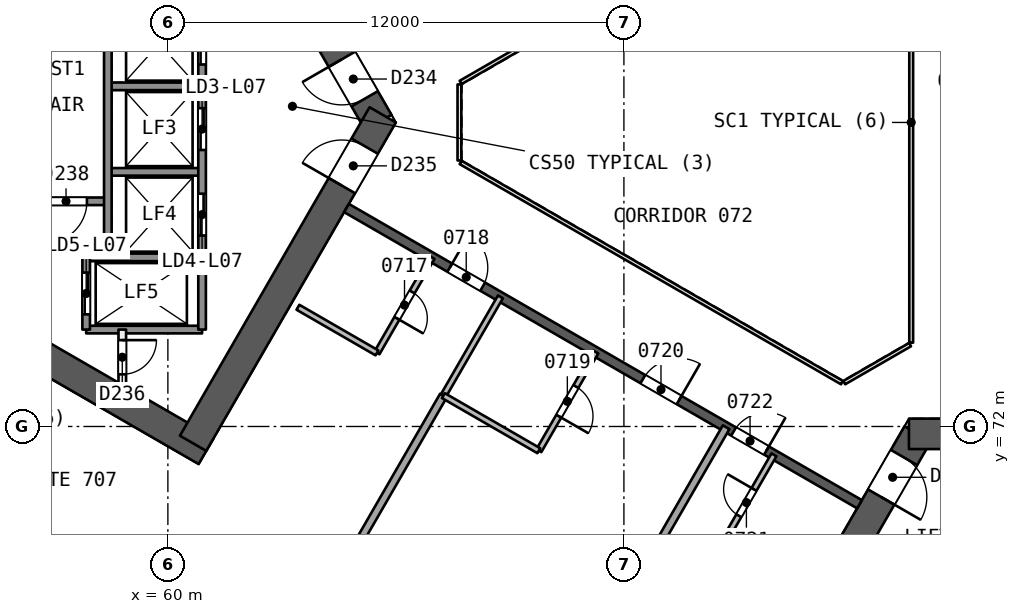
"""IFC4 building model, lengths in metres.
Left out: names, types, materials, properties, quantities, classifications, styles, units other than length and angle.
Written with IfcOpenShell. Run it as: python <this file> out.ifc"""

import sys

from ifc_helpers import new_model, si_unit, direction, frame, frame_2d, origin, place, context, subcontext, project, spatial, rectangle, extrude, element, fill, save


model = new_model("IFC4")
c1 = context("Model", 3, precision=1e-05, world=origin(), true_north=direction((0.0, 1.0)))
c2 = subcontext(c1, "Body", "Model", "MODEL_VIEW")
j1 = project(units=[si_unit("LENGTHUNIT", "METRE"), si_unit("PLANEANGLEUNIT", "RADIAN")], contexts=[c1])
p1 = place(None, origin())
s1 = spatial("IfcSite", under=j1, at=p1, CompositionType="ELEMENT")
p2 = place(p1, origin())
s2 = spatial("IfcBuilding", under=s1, at=p2, CompositionType="ELEMENT")
p3 = place(p2, frame((0.0, 0.0, 37.4)))
s3 = spatial("IfcBuildingStorey", under=s2, at=p3, CompositionType="ELEMENT", Elevation=37.4)
p4 = place(p3, frame((65.538, 80.0, 0.0), z_axis=(0.0, 0.0, 1.0), x_axis=(-0.49999662545, 0.866027352073, 0.0)))
e1 = element("IfcWall", 1, at=p4, inside=s3, PredefinedType="SHEAR", context=c2, shape_type="SweptSolid", body=[
    extrude(rectangle(XDim=10.149, YDim=0.8, at=frame_2d((5.074, 0.0))), origin(), (0.0, 0.0, 1.0), 3.7),
])
p5 = place(p4, frame((0.719, 0.0, 0.0)))
e2 = element("IfcOpeningElement", 2, at=p5, cuts=e1, PredefinedType="OPENING", context=c2, shape_type="SweptSolid", body=[
    extrude(rectangle(XDim=1.2, YDim=2.1, at=frame_2d((0.6, 1.05))), frame((0.0, 0.411, 0.0), z_axis=(0.0, -1.0, 0.0), x_axis=(1.0, 0.0, 0.0)), (0.0, 0.0, 1.0), 0.821),
])
p6 = place(p3, frame((60.664, 88.443, 0.0), z_axis=(0.0, 0.0, 1.0), x_axis=(-0.866029478545, -0.499992942241, 0.0)))
e3 = element("IfcWall", 3, at=p6, inside=s3, PredefinedType="SHEAR", context=c2, shape_type="SweptSolid", body=[
    extrude(rectangle(XDim=13.933, YDim=0.8, at=frame_2d((6.967, 0.0))), origin(), (0.0, 0.0, 1.0), 3.7),
])
p7 = place(p3, frame((48.797, 78.408, 0.0), z_axis=(0.0, 0.0, 1.0), x_axis=(0.866032504327, -0.499987701298, 0.0)))
e4 = element("IfcWall", 4, at=p7, inside=s3, PredefinedType="SHEAR", context=c2, shape_type="SweptSolid", body=[
    extrude(rectangle(XDim=14.102, YDim=0.8, at=frame_2d((7.051, 0.0))), origin(), (0.0, 0.0, 1.0), 3.7),
])
p8 = place(p3, frame((60.664, 71.557, 0.0), z_axis=(0.0, 0.0, 1.0), x_axis=(0.50000409368, 0.866023040284, 0.0)))
e5 = element("IfcWall", 5, at=p8, inside=s3, PredefinedType="SHEAR", context=c2, shape_type="SweptSolid", body=[
    extrude(rectangle(XDim=9.98, YDim=0.8, at=frame_2d((4.99, 0.0))), origin(), (0.0, 0.0, 1.0), 3.7),
])
p9 = place(p8, frame((7.83, 0.0, 0.0)))
e6 = element("IfcOpeningElement", 6, at=p9, cuts=e5, PredefinedType="OPENING", context=c2, shape_type="SweptSolid", body=[
    extrude(rectangle(XDim=1.2, YDim=2.1, at=frame_2d((0.6, 1.05))), frame((0.0, 0.411, 0.0), z_axis=(0.0, -1.0, 0.0), x_axis=(1.0, 0.0, 0.0)), (0.0, 0.0, 1.0), 0.821),
])
p10 = place(p3, frame((79.731, 71.806, 0.0), z_axis=(0.0, 0.0, 1.0), x_axis=(-0.49999662545, -0.866027352073, 0.0)))
e7 = element("IfcWall", 7, at=p10, inside=s3, PredefinedType="SHEAR", context=c2, shape_type="SweptSolid", body=[
    extrude(rectangle(XDim=10.149, YDim=0.8, at=frame_2d((5.074, 0.0))), origin(), (0.0, 0.0, 1.0), 3.7),
])
p11 = place(p10, frame((0.719, 0.0, 0.0)))
e8 = element("IfcOpeningElement", 8, at=p11, cuts=e7, PredefinedType="OPENING", context=c2, shape_type="SweptSolid", body=[
    extrude(rectangle(XDim=1.2, YDim=2.1, at=frame_2d((0.6, 1.05))), frame((0.0, 0.411, 0.0), z_axis=(0.0, -1.0, 0.0), x_axis=(1.0, 0.0, 0.0)), (0.0, 0.0, 1.0), 0.821),
])
p12 = place(p3, frame((89.48, 71.806, 0.0), z_axis=(0.0, 0.0, 1.0), x_axis=(-1.0, 0.0, 0.0)))
e9 = element("IfcWall", 9, at=p12, inside=s3, PredefinedType="SHEAR", context=c2, shape_type="SweptSolid", body=[
    extrude(rectangle(XDim=9.98, YDim=0.8, at=frame_2d((4.99, 0.0))), origin(), (0.0, 0.0, 1.0), 3.7),
])
p13 = place(p12, frame((7.83, 0.0, 0.0)))
e10 = element("IfcOpeningElement", 10, at=p13, cuts=e9, PredefinedType="OPENING", context=c2, shape_type="SweptSolid", body=[
    extrude(rectangle(XDim=1.2, YDim=2.1, at=frame_2d((0.6, 1.05))), frame((0.0, 0.411, 0.0), z_axis=(0.0, -1.0, 0.0), x_axis=(1.0, 0.0, 0.0)), (0.0, 0.0, 1.0), 0.821),
])
p14 = place(p3, frame((64.7, 77.748, 0.0), z_axis=(0.0, 0.0, 1.0), x_axis=(0.866026492143, -0.499998114903, 0.0)))
e11 = element("IfcWall", 11, at=p14, inside=s3, PredefinedType="SHEAR", context=c2, shape_type="SweptSolid", body=[
    extrude(rectangle(XDim=15.588, YDim=0.25, at=frame_2d((7.794, 0.0))), origin(), (0.0, 0.0, 1.0), 3.2),
])
p15 = place(p14, frame((3.138, 0.0, 0.0)))
e12 = element("IfcOpeningElement", 12, at=p15, cuts=e11, PredefinedType="OPENING", context=c2, shape_type="SweptSolid", body=[
    extrude(rectangle(XDim=1.0, YDim=2.1, at=frame_2d((0.5, 1.05))), frame((0.0, 0.135, 0.0), z_axis=(0.0, -1.0, 0.0), x_axis=(1.0, 0.0, 0.0)), (0.0, 0.0, 1.0), 0.271),
])
p16 = place(p14, frame((9.006, 0.0, 0.0)))
e13 = element("IfcOpeningElement", 13, at=p16, cuts=e11, PredefinedType="OPENING", context=c2, shape_type="SweptSolid", body=[
    extrude(rectangle(XDim=1.1, YDim=2.1, at=frame_2d((0.55, 1.05))), frame((0.0, 0.135, 0.0), z_axis=(0.0, -1.0, 0.0), x_axis=(1.0, 0.0, 0.0)), (0.0, 0.0, 1.0), 0.271),
])
p17 = place(p14, frame((11.762, 0.0, 0.0)))
e14 = element("IfcOpeningElement", 14, at=p17, cuts=e11, PredefinedType="OPENING", context=c2, shape_type="SweptSolid", body=[
    extrude(rectangle(XDim=1.0, YDim=2.1, at=frame_2d((0.5, 1.05))), frame((0.0, 0.135, 0.0), z_axis=(0.0, -1.0, 0.0), x_axis=(1.0, 0.0, 0.0)), (0.0, 0.0, 1.0), 0.271),
])
p18 = place(p3, frame((66.952, 76.448, 0.0), z_axis=(0.0, 0.0, 1.0), x_axis=(-0.499987231761, -0.866032775405, 0.0)))
e15 = element("IfcWall", 15, at=p18, inside=s3, PredefinedType="PARTITIONING", context=c2, shape_type="SweptSolid", body=[
    extrude(rectangle(XDim=2.9, YDim=0.15, at=frame_2d((1.45, 0.0))), origin(), (0.0, 0.0, 1.0), 3.2),
])
p19 = place(p18, frame((1.05, 0.0, 0.0)))
e16 = element("IfcOpeningElement", 16, at=p19, cuts=e15, PredefinedType="OPENING", context=c2, shape_type="SweptSolid", body=[
    extrude(rectangle(XDim=0.8, YDim=2.1, at=frame_2d((0.4, 1.05))), frame((0.0, 0.085, 0.0), z_axis=(0.0, -1.0, 0.0), x_axis=(1.0, 0.0, 0.0)), (0.0, 0.0, 1.0), 0.171),
])
p20 = place(p3, frame((65.502, 73.937, 0.0), z_axis=(0.0, 0.0, 1.0), x_axis=(-0.865994240961, 0.500053971709, 0.0)))
e17 = element("IfcWall", 17, at=p20, inside=s3, PredefinedType="PARTITIONING", context=c2, shape_type="SweptSolid", body=[
    extrude(rectangle(XDim=2.401, YDim=0.15, at=frame_2d((1.201, 0.0))), origin(), (0.0, 0.0, 1.0), 3.2),
])
p21 = place(p3, frame((61.699, 63.198, 0.0), z_axis=(0.0, 0.0, 1.0), x_axis=(0.499999115929, 0.866025914202, 0.0)))
e18 = element("IfcWall", 18, at=p21, inside=s3, PredefinedType="PARTITIONING", context=c2, shape_type="SweptSolid", body=[
    extrude(rectangle(XDim=11.102, YDim=0.2, at=frame_2d((5.551, 0.0))), origin(), (0.0, 0.0, 1.0), 3.2),
])
p22 = place(p3, frame((67.25, 72.812, 0.0), z_axis=(0.0, 0.0, 1.0), x_axis=(0.499990139034, 0.866031096941, 0.0)))
e19 = element("IfcWall", 19, at=p22, inside=s3, PredefinedType="PARTITIONING", context=c2, shape_type="SweptSolid", body=[
    extrude(rectangle(XDim=3.0, YDim=0.15, at=frame_2d((1.5, 0.0))), origin(), (0.0, 0.0, 1.0), 3.2),
])
p23 = place(p3, frame((71.261, 73.96, 0.0), z_axis=(0.0, 0.0, 1.0), x_axis=(-0.50002537861, -0.866010750942, 0.0)))
e20 = element("IfcWall", 20, at=p23, inside=s3, PredefinedType="PARTITIONING", context=c2, shape_type="SweptSolid", body=[
    extrude(rectangle(XDim=3.0, YDim=0.15, at=frame_2d((1.5, 0.0))), origin(), (0.0, 0.0, 1.0), 3.2),
])
p24 = place(p23, frame((1.05, 0.0, 0.0)))
e21 = element("IfcOpeningElement", 21, at=p24, cuts=e20, PredefinedType="OPENING", context=c2, shape_type="SweptSolid", body=[
    extrude(rectangle(XDim=0.9, YDim=2.1, at=frame_2d((0.45, 1.05))), frame((0.0, 0.085, 0.0), z_axis=(0.0, -1.0, 0.0), x_axis=(1.0, 0.0, 0.0)), (0.0, 0.0, 1.0), 0.171),
])
p25 = place(p3, frame((69.761, 71.362, 0.0), z_axis=(0.0, 0.0, 1.0), x_axis=(-0.866032775405, 0.499987231761, 0.0)))
e22 = element("IfcWall", 22, at=p25, inside=s3, PredefinedType="PARTITIONING", context=c2, shape_type="SweptSolid", body=[
    extrude(rectangle(XDim=2.9, YDim=0.15, at=frame_2d((1.45, 0.0))), origin(), (0.0, 0.0, 1.0), 3.2),
])
p26 = place(p3, frame((67.639, 59.768, 0.0), z_axis=(0.0, 0.0, 1.0), x_axis=(0.499997206141, 0.866027016814, 0.0)))
e23 = element("IfcWall", 23, at=p26, inside=s3, PredefinedType="PARTITIONING", context=c2, shape_type="SweptSolid", body=[
    extrude(rectangle(XDim=14.102, YDim=0.2, at=frame_2d((7.051, 0.0))), origin(), (0.0, 0.0, 1.0), 3.2),
])
p27 = place(p3, frame((74.498, 68.743, 0.0), z_axis=(0.0, 0.0, 1.0), x_axis=(0.499987231761, 0.866032775405, 0.0)))
e24 = element("IfcWall", 24, at=p27, inside=s3, PredefinedType="PARTITIONING", context=c2, shape_type="SweptSolid", body=[
    extrude(rectangle(XDim=2.9, YDim=0.15, at=frame_2d((1.45, 0.0))), origin(), (0.0, 0.0, 1.0), 3.2),
])
p28 = place(p27, frame((1.05, 0.0, 0.0)))
e25 = element("IfcOpeningElement", 25, at=p28, cuts=e24, PredefinedType="OPENING", context=c2, shape_type="SweptSolid", body=[
    extrude(rectangle(XDim=0.8, YDim=2.1, at=frame_2d((0.4, 1.05))), frame((0.0, 0.085, 0.0), z_axis=(0.0, -1.0, 0.0), x_axis=(1.0, 0.0, 0.0)), (0.0, 0.0, 1.0), 0.171),
])
p29 = place(p3, frame((90.91, 46.161, 0.0), z_axis=(0.0, 0.0, 1.0), x_axis=(-0.866026524777, 0.499998058379, 0.0)))
e26 = element("IfcWall", 26, at=p29, inside=s3, PredefinedType="SOLIDWALL", context=c2, shape_type="SweptSolid", body=[
    extrude(rectangle(XDim=61.395, YDim=0.3, at=frame_2d((30.698, 0.0))), origin(), (0.0, 0.0, 1.0), 3.2),
])
p30 = place(p29, frame((29.186, 0.0, 0.0)))
e27 = element("IfcOpeningElement", 27, at=p30, cuts=e26, PredefinedType="OPENING", context=c2, shape_type="SweptSolid", body=[
    extrude(rectangle(XDim=2.4, YDim=2.4, at=frame_2d((1.2, 1.2))), frame((0.0, 0.161, 0.0), z_axis=(0.0, -1.0, 0.0), x_axis=(1.0, 0.0, 0.0)), (0.0, 0.0, 1.0), 0.321),
])
p31 = place(p29, frame((46.448, 0.0, 0.0)))
e28 = element("IfcOpeningElement", 28, at=p31, cuts=e26, PredefinedType="OPENING", context=c2, shape_type="SweptSolid", body=[
    extrude(rectangle(XDim=2.4, YDim=2.4, at=frame_2d((1.2, 1.2))), frame((0.0, 0.161, 0.0), z_axis=(0.0, -1.0, 0.0), x_axis=(1.0, 0.0, 0.0)), (0.0, 0.0, 1.0), 0.321),
])
p32 = place(p29, frame((12.235, 0.0, 0.0)))
e29 = element("IfcOpeningElement", 29, at=p32, cuts=e26, PredefinedType="OPENING", context=c2, shape_type="SweptSolid", body=[
    extrude(rectangle(XDim=2.4, YDim=2.4, at=frame_2d((1.2, 1.2))), frame((0.0, 0.161, 0.0), z_axis=(0.0, -1.0, 0.0), x_axis=(1.0, 0.0, 0.0)), (0.0, 0.0, 1.0), 0.321),
])
for number, where, z_axis, x_axis in (
    (30, (60.9, 80.95, 0.0), (0.0, 0.0, 1.0), (-1.0, 0.0, 0.0)),
    (31, (60.9, 78.7, 0.0), (0.0, 0.0, 1.0), (-1.0, 0.0, 0.0)),
):
    element("IfcWall", number, at=place(p3, frame(where, z_axis=z_axis, x_axis=x_axis)), inside=s3, PredefinedType="SOLIDWALL", context=c2, shape_type="SweptSolid", body=[
        extrude(rectangle(XDim=2.48, YDim=0.2, at=frame_2d((1.24, 0.0))), origin(), (0.0, 0.0, 1.0), 3.2),
    ])
p33 = place(p3, frame((58.42, 77.925, 0.0), z_axis=(0.0, 0.0, 1.0), x_axis=(-1.0, 0.0, 0.0)))
e32 = element("IfcWall", 32, at=p33, inside=s3, PredefinedType="SOLIDWALL", context=c2, shape_type="SweptSolid", body=[
    extrude(rectangle(XDim=7.7, YDim=0.2, at=frame_2d((3.85, 0.0))), origin(), (0.0, 0.0, 1.0), 3.2),
])
p34 = place(p33, frame((0.55, 0.0, 0.0)))
e33 = element("IfcOpeningElement", 33, at=p34, cuts=e32, PredefinedType="OPENING", context=c2, shape_type="SweptSolid", body=[
    extrude(rectangle(XDim=1.1, YDim=2.1, at=frame_2d((0.55, 1.05))), frame((0.0, 0.11, 0.0), z_axis=(0.0, -1.0, 0.0), x_axis=(1.0, 0.0, 0.0)), (0.0, 0.0, 1.0), 0.221),
])
for number, where, z_axis, x_axis in (
    (34, (60.9, 76.45, 0.0), (0.0, 0.0, 1.0), (-1.0, 0.0, 0.0)),
    (35, (60.9, 74.55, 0.0), (0.0, 0.0, 1.0), (-1.0, 0.0, 0.0)),
):
    element("IfcWall", number, at=place(p3, frame(where, z_axis=z_axis, x_axis=x_axis)), inside=s3, PredefinedType="SOLIDWALL", context=c2, shape_type="SweptSolid", body=[
        extrude(rectangle(XDim=3.05, YDim=0.2, at=frame_2d((1.525, 0.0))), origin(), (0.0, 0.0, 1.0), 3.2),
    ])
p35 = place(p3, frame((60.9, 85.45, 0.0), z_axis=(0.0, 0.0, 1.0), x_axis=(0.0, -1.0, 0.0)))
e36 = element("IfcWall", 36, at=p35, inside=s3, PredefinedType="SOLIDWALL", context=c2, shape_type="SweptSolid", body=[
    extrude(rectangle(XDim=10.9, YDim=0.2, at=frame_2d((5.45, 0.0))), origin(), (0.0, 0.0, 1.0), 3.2),
])
p36 = place(p35, frame((0.575, 0.0, 0.0)))
e37 = element("IfcOpeningElement", 37, at=p36, cuts=e36, PredefinedType="OPENING", context=c2, shape_type="SweptSolid", body=[
    extrude(rectangle(XDim=1.1, YDim=2.1, at=frame_2d((0.55, 1.05))), frame((0.0, 0.11, 0.0), z_axis=(0.0, -1.0, 0.0), x_axis=(1.0, 0.0, 0.0)), (0.0, 0.0, 1.0), 0.221),
])
p37 = place(p35, frame((2.825, 0.0, 0.0)))
e38 = element("IfcOpeningElement", 38, at=p37, cuts=e36, PredefinedType="OPENING", context=c2, shape_type="SweptSolid", body=[
    extrude(rectangle(XDim=1.1, YDim=2.1, at=frame_2d((0.55, 1.05))), frame((0.0, 0.11, 0.0), z_axis=(0.0, -1.0, 0.0), x_axis=(1.0, 0.0, 0.0)), (0.0, 0.0, 1.0), 0.221),
])
p38 = place(p35, frame((5.075, 0.0, 0.0)))
e39 = element("IfcOpeningElement", 39, at=p38, cuts=e36, PredefinedType="OPENING", context=c2, shape_type="SweptSolid", body=[
    extrude(rectangle(XDim=1.1, YDim=2.1, at=frame_2d((0.55, 1.05))), frame((0.0, 0.11, 0.0), z_axis=(0.0, -1.0, 0.0), x_axis=(1.0, 0.0, 0.0)), (0.0, 0.0, 1.0), 0.221),
])
p39 = place(p35, frame((7.325, 0.0, 0.0)))
e40 = element("IfcOpeningElement", 40, at=p39, cuts=e36, PredefinedType="OPENING", context=c2, shape_type="SweptSolid", body=[
    extrude(rectangle(XDim=1.1, YDim=2.1, at=frame_2d((0.55, 1.05))), frame((0.0, 0.11, 0.0), z_axis=(0.0, -1.0, 0.0), x_axis=(1.0, 0.0, 0.0)), (0.0, 0.0, 1.0), 0.221),
])
p40 = place(p3, frame((58.8, 74.55, 0.0), z_axis=(0.0, 0.0, 1.0), x_axis=(0.0, -1.0, 0.0)))
e41 = element("IfcWall", 41, at=p40, inside=s3, PredefinedType="PARTITIONING", context=c2, shape_type="SweptSolid", body=[
    extrude(rectangle(XDim=1.455, YDim=0.2, at=frame_2d((0.728, 0.0))), origin(), (0.0, 0.0, 1.0), 3.2),
])
p41 = place(p40, frame((0.278, 0.0, 0.0)))
e42 = element("IfcOpeningElement", 42, at=p41, cuts=e41, PredefinedType="OPENING", context=c2, shape_type="SweptSolid", body=[
    extrude(rectangle(XDim=0.9, YDim=2.1, at=frame_2d((0.45, 1.05))), frame((0.0, 0.11, 0.0), z_axis=(0.0, -1.0, 0.0), x_axis=(1.0, 0.0, 0.0)), (0.0, 0.0, 1.0), 0.221),
])
p42 = place(p3, frame((58.42, 85.45, 0.0), z_axis=(0.0, 0.0, 1.0), x_axis=(0.0, -1.0, 0.0)))
e43 = element("IfcWall", 43, at=p42, inside=s3, PredefinedType="SOLIDWALL", context=c2, shape_type="SweptSolid", body=[
    extrude(rectangle(XDim=9.0, YDim=0.2, at=frame_2d((4.5, 0.0))), origin(), (0.0, 0.0, 1.0), 3.2),
])
p43 = place(p3, frame((57.85, 76.45, 0.0), z_axis=(0.0, 0.0, 1.0), x_axis=(0.0, -1.0, 0.0)))
e44 = element("IfcWall", 44, at=p43, inside=s3, PredefinedType="SOLIDWALL", context=c2, shape_type="SweptSolid", body=[
    extrude(rectangle(XDim=1.9, YDim=0.2, at=frame_2d((0.95, 0.0))), origin(), (0.0, 0.0, 1.0), 3.2),
])
p44 = place(p43, frame((0.4, 0.0, 0.0)))
e45 = element("IfcOpeningElement", 45, at=p44, cuts=e44, PredefinedType="OPENING", context=c2, shape_type="SweptSolid", body=[
    extrude(rectangle(XDim=1.1, YDim=2.1, at=frame_2d((0.55, 1.05))), frame((0.0, 0.11, 0.0), z_axis=(0.0, -1.0, 0.0), x_axis=(1.0, 0.0, 0.0)), (0.0, 0.0, 1.0), 0.221),
])
p45 = place(p3, frame((77.135, 64.952, 0.0), z_axis=(0.0, 0.0, 1.0), x_axis=(0.866031916153, 0.499988720078, 0.0)))
e46 = element("IfcWall", 46, at=p45, inside=s3, PredefinedType="SOLIDWALL", context=c2, shape_type="SweptSolid", body=[
    extrude(rectangle(XDim=11.35, YDim=0.2, at=frame_2d((5.675, 0.0))), origin(), (0.0, 0.0, 1.0), 3.2),
])
for number, where, z_axis, x_axis in (
    (47, (79.56, 74.206, 0.0), (0.0, 0.0, 1.0), (0.0, 1.0, 0.0)),
    (48, (77.738, 86.846, 0.0), (0.0, 0.0, 1.0), (-0.866, -0.5, 0.0)),
):
    element("IfcWall", number, at=place(p3, frame(where, z_axis=z_axis, x_axis=x_axis)), inside=s3, PredefinedType="PARTITIONING", context=c2, shape_type="SweptSolid", body=[
        extrude(rectangle(XDim=11.588, YDim=0.1, at=frame_2d((5.794, 0.0))), origin(), (0.0, 0.0, 1.0), 3.2),
    ])
p46 = place(p3, frame((67.672, 81.0, 0.0), z_axis=(0.0, 0.0, 1.0), x_axis=(0.0, -1.0, 0.0)))
e49 = element("IfcWall", 49, at=p46, inside=s3, PredefinedType="PARTITIONING", context=c2, shape_type="SweptSolid", body=[
    extrude(rectangle(XDim=2.0, YDim=0.1, at=frame_2d((1.0, 0.0))), origin(), (0.0, 0.0, 1.0), 3.2),
])
p47 = place(p3, frame((67.702, 78.948, 0.0), z_axis=(0.0, 0.0, 1.0), x_axis=(0.866026658274, -0.499997827154, 0.0)))
e50 = element("IfcWall", 50, at=p47, inside=s3, PredefinedType="PARTITIONING", context=c2, shape_type="SweptSolid", body=[
    extrude(rectangle(XDim=11.588, YDim=0.1, at=frame_2d((5.794, 0.0))), origin(), (0.0, 0.0, 1.0), 3.2),
])
p48 = place(p3, frame((77.798, 73.154, 0.0), z_axis=(0.0, 0.0, 1.0), x_axis=(0.866041268327, 0.499972520799, 0.0)))
e51 = element("IfcWall", 51, at=p48, inside=s3, PredefinedType="PARTITIONING", context=c2, shape_type="SweptSolid", body=[
    extrude(rectangle(XDim=2.0, YDim=0.1, at=frame_2d((1.0, 0.0))), origin(), (0.0, 0.0, 1.0), 3.2),
])
p49 = place(p19, origin())
e52 = element("IfcDoor", 52, at=p49, inside=s3, OperationType="SINGLE_SWING_RIGHT", PredefinedType="NOTDEFINED", context=c2, shape_type="SweptSolid", body=[
    extrude(rectangle(XDim=0.8, YDim=2.1, at=frame_2d((0.4, 1.05))), frame((0.0, 0.025, 0.0), z_axis=(0.0, -1.0, 0.0), x_axis=(1.0, 0.0, 0.0)), (0.0, 0.0, 1.0), 0.05),
])
fill(e16, e52)
p50 = place(p15, origin())
e53 = element("IfcDoor", 53, at=p50, inside=s3, OperationType="SINGLE_SWING_LEFT", PredefinedType="NOTDEFINED", context=c2, shape_type="SweptSolid", body=[
    extrude(rectangle(XDim=1.0, YDim=2.1, at=frame_2d((0.5, 1.05))), frame((0.0, 0.025, 0.0), z_axis=(0.0, -1.0, 0.0), x_axis=(1.0, 0.0, 0.0)), (0.0, 0.0, 1.0), 0.05),
])
fill(e12, e53)
p51 = place(p24, origin())
e54 = element("IfcDoor", 54, at=p51, inside=s3, OperationType="SINGLE_SWING_RIGHT", PredefinedType="NOTDEFINED", context=c2, shape_type="SweptSolid", body=[
    extrude(rectangle(XDim=0.9, YDim=2.1, at=frame_2d((0.45, 1.05))), frame((0.0, 0.025, 0.0), z_axis=(0.0, -1.0, 0.0), x_axis=(1.0, 0.0, 0.0)), (0.0, 0.0, 1.0), 0.05),
])
fill(e21, e54)
p52 = place(p16, origin())
e55 = element("IfcDoor", 55, at=p52, inside=s3, OperationType="SINGLE_SWING_RIGHT", PredefinedType="NOTDEFINED", context=c2, shape_type="SweptSolid", body=[
    extrude(rectangle(XDim=1.1, YDim=2.1, at=frame_2d((0.55, 1.05))), frame((0.0, 0.025, 0.0), z_axis=(0.0, -1.0, 0.0), x_axis=(1.0, 0.0, 0.0)), (0.0, 0.0, 1.0), 0.05),
])
fill(e13, e55)
p53 = place(p28, origin())
e56 = element("IfcDoor", 56, at=p53, inside=s3, OperationType="SINGLE_SWING_RIGHT", PredefinedType="NOTDEFINED", context=c2, shape_type="SweptSolid", body=[
    extrude(rectangle(XDim=0.8, YDim=2.1, at=frame_2d((0.4, 1.05))), frame((0.0, 0.025, 0.0), z_axis=(0.0, -1.0, 0.0), x_axis=(1.0, 0.0, 0.0)), (0.0, 0.0, 1.0), 0.05),
])
fill(e25, e56)
p54 = place(p17, origin())
e57 = element("IfcDoor", 57, at=p54, inside=s3, OperationType="SINGLE_SWING_RIGHT", PredefinedType="NOTDEFINED", context=c2, shape_type="SweptSolid", body=[
    extrude(rectangle(XDim=1.0, YDim=2.1, at=frame_2d((0.5, 1.05))), frame((0.0, 0.025, 0.0), z_axis=(0.0, -1.0, 0.0), x_axis=(1.0, 0.0, 0.0)), (0.0, 0.0, 1.0), 0.05),
])
fill(e14, e57)
p55 = place(p5, origin())
e58 = element("IfcDoor", 58, at=p55, inside=s3, OperationType="SINGLE_SWING_RIGHT", PredefinedType="NOTDEFINED", context=c2, shape_type="SweptSolid", body=[
    extrude(rectangle(XDim=1.2, YDim=2.1, at=frame_2d((0.6, 1.05))), frame((0.0, 0.025, 0.0), z_axis=(0.0, -1.0, 0.0), x_axis=(1.0, 0.0, 0.0)), (0.0, 0.0, 1.0), 0.05),
])
fill(e2, e58)
p56 = place(p9, origin())
e59 = element("IfcDoor", 59, at=p56, inside=s3, OperationType="SINGLE_SWING_LEFT", PredefinedType="NOTDEFINED", context=c2, shape_type="SweptSolid", body=[
    extrude(rectangle(XDim=1.2, YDim=2.1, at=frame_2d((0.6, 1.05))), frame((0.0, 0.025, 0.0), z_axis=(0.0, -1.0, 0.0), x_axis=(1.0, 0.0, 0.0)), (0.0, 0.0, 1.0), 0.05),
])
fill(e6, e59)
p57 = place(p37, origin())
e60 = element("IfcDoor", 60, at=p57, inside=s3, OperationType="SLIDING_TO_LEFT", PredefinedType="NOTDEFINED", context=c2, shape_type="SweptSolid", body=[
    extrude(rectangle(XDim=1.1, YDim=2.1, at=frame_2d((0.55, 1.05))), frame((0.0, 0.025, 0.0), z_axis=(0.0, -1.0, 0.0), x_axis=(1.0, 0.0, 0.0)), (0.0, 0.0, 1.0), 0.05),
])
fill(e38, e60)
p58 = place(p38, origin())
e61 = element("IfcDoor", 61, at=p58, inside=s3, OperationType="SLIDING_TO_RIGHT", PredefinedType="NOTDEFINED", context=c2, shape_type="SweptSolid", body=[
    extrude(rectangle(XDim=1.1, YDim=2.1, at=frame_2d((0.55, 1.05))), frame((0.0, 0.025, 0.0), z_axis=(0.0, -1.0, 0.0), x_axis=(1.0, 0.0, 0.0)), (0.0, 0.0, 1.0), 0.05),
])
fill(e39, e61)
p59 = place(p39, origin())
e62 = element("IfcDoor", 62, at=p59, inside=s3, OperationType="SLIDING_TO_LEFT", PredefinedType="NOTDEFINED", context=c2, shape_type="SweptSolid", body=[
    extrude(rectangle(XDim=1.1, YDim=2.1, at=frame_2d((0.55, 1.05))), frame((0.0, 0.025, 0.0), z_axis=(0.0, -1.0, 0.0), x_axis=(1.0, 0.0, 0.0)), (0.0, 0.0, 1.0), 0.05),
])
fill(e40, e62)
p60 = place(p44, origin())
e63 = element("IfcDoor", 63, at=p60, inside=s3, OperationType="SLIDING_TO_RIGHT", PredefinedType="NOTDEFINED", context=c2, shape_type="SweptSolid", body=[
    extrude(rectangle(XDim=1.1, YDim=2.1, at=frame_2d((0.55, 1.05))), frame((0.0, 0.025, 0.0), z_axis=(0.0, -1.0, 0.0), x_axis=(1.0, 0.0, 0.0)), (0.0, 0.0, 1.0), 0.05),
])
fill(e45, e63)
p61 = place(p41, origin())
e64 = element("IfcDoor", 64, at=p61, inside=s3, OperationType="SINGLE_SWING_LEFT", PredefinedType="NOTDEFINED", context=c2, shape_type="SweptSolid", body=[
    extrude(rectangle(XDim=0.9, YDim=2.1, at=frame_2d((0.45, 1.05))), frame((0.0, 0.025, 0.0), z_axis=(0.0, -1.0, 0.0), x_axis=(1.0, 0.0, 0.0)), (0.0, 0.0, 1.0), 0.05),
])
fill(e42, e64)
p62 = place(p34, origin())
e65 = element("IfcDoor", 65, at=p62, inside=s3, OperationType="SINGLE_SWING_RIGHT", PredefinedType="NOTDEFINED", context=c2, shape_type="SweptSolid", body=[
    extrude(rectangle(XDim=1.1, YDim=2.1, at=frame_2d((0.55, 1.05))), frame((0.0, 0.025, 0.0), z_axis=(0.0, -1.0, 0.0), x_axis=(1.0, 0.0, 0.0)), (0.0, 0.0, 1.0), 0.05),
])
fill(e33, e65)
p63 = place(p11, origin())
e66 = element("IfcDoor", 66, at=p63, inside=s3, OperationType="SINGLE_SWING_RIGHT", PredefinedType="NOTDEFINED", context=c2, shape_type="SweptSolid", body=[
    extrude(rectangle(XDim=1.2, YDim=2.1, at=frame_2d((0.6, 1.05))), frame((0.0, 0.025, 0.0), z_axis=(0.0, -1.0, 0.0), x_axis=(1.0, 0.0, 0.0)), (0.0, 0.0, 1.0), 0.05),
])
fill(e8, e66)
save(model, sys.argv[1])
